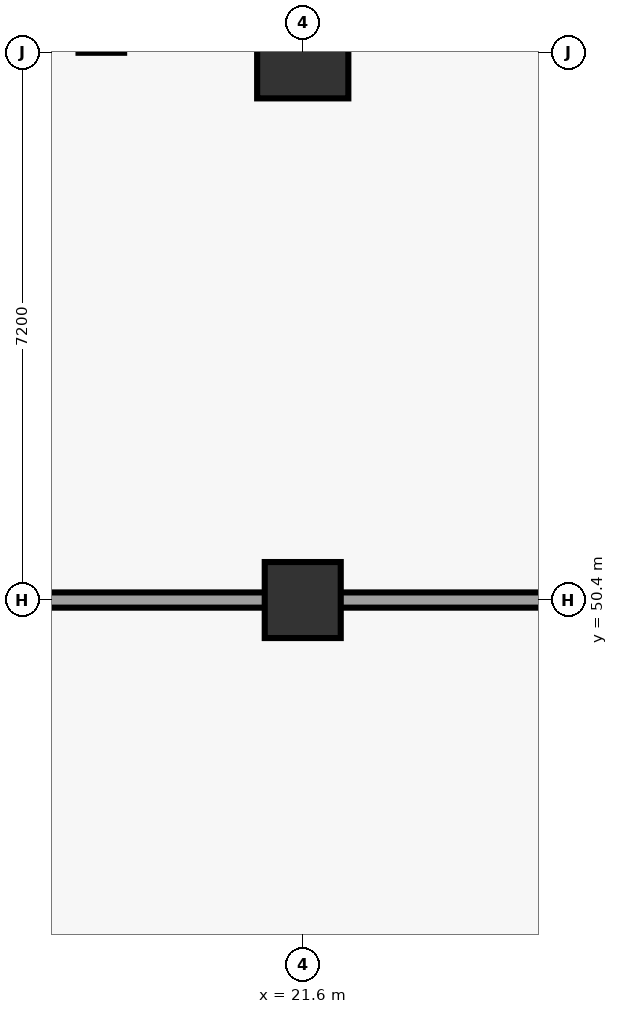
"""IFC4 building model, lengths in metres.
Left out: names, types, materials, properties, quantities, classifications, styles, units other than length and angle.
Written with IfcOpenShell. Run it as: python <this file> out.ifc"""

import sys

from ifc_helpers import new_model, si_unit, direction, frame, frame_2d, origin, origin_2d, place, context, subcontext, project, spatial, rectangle, circle, extrude, element, save


model = new_model("IFC4")
c1 = context("Model", 3, precision=1e-05, world=origin(), true_north=direction((0.0, 1.0)))
c2 = subcontext(c1, "Body", "Model", "MODEL_VIEW")
j1 = project(units=[si_unit("LENGTHUNIT", "METRE"), si_unit("PLANEANGLEUNIT", "RADIAN")], contexts=[c1])
p1 = place(None, origin())
s1 = spatial("IfcSite", under=j1, at=p1, CompositionType="ELEMENT")
p2 = place(p1, origin())
s2 = spatial("IfcBuilding", under=s1, at=p2, CompositionType="ELEMENT")
p3 = place(p2, frame((0.0, 0.0, -5.4)))
s3 = spatial("IfcBuildingStorey", under=s2, at=p3, CompositionType="ELEMENT", Elevation=-5.4)
p4 = place(p3, frame((21.6, 50.4, 0.0), z_axis=(0.0, 0.0, 1.0), x_axis=(1.0, 0.0, 0.0)))
e1 = element("IfcColumn", 1, at=p4, inside=s3, PredefinedType="COLUMN", context=c2, shape_type="SweptSolid", body=[
    extrude(rectangle(XDim=1.0, YDim=1.0, at=origin_2d()), origin(), (0.0, 0.0, 1.0), 5.4),
])
p5 = place(p3, frame((21.6, 57.6, 0.0), z_axis=(0.0, 0.0, 1.0), x_axis=(1.0, 0.0, 0.0)))
e2 = element("IfcColumn", 2, at=p5, inside=s3, PredefinedType="COLUMN", context=c2, shape_type="SweptSolid", body=[
    extrude(circle(Radius=0.6, at=origin_2d()), origin(), (0.0, 0.0, 1.0), 5.4),
])
p6 = place(p3, frame((18.95, 57.9, 0.0), z_axis=(0.0, 0.0, 1.0), x_axis=(1.0, 0.0, 0.0)))
e3 = element("IfcColumn", 3, at=p6, inside=s3, PredefinedType="COLUMN", context=c2, shape_type="SweptSolid", body=[
    extrude(rectangle(XDim=0.6, YDim=0.6, at=origin_2d()), origin(), (0.0, 0.0, 1.0), 5.4),
])
p7 = place(p3, frame((42.0, 50.4, 0.0), z_axis=(0.0, 0.0, 1.0), x_axis=(-1.0, 0.0, 0.0)))
e4 = element("IfcWall", 4, at=p7, inside=s3, PredefinedType="PARTITIONING", context=c2, shape_type="SweptSolid", body=[
    extrude(rectangle(XDim=32.8, YDim=0.2, at=frame_2d((16.4, 0.0))), origin(), (0.0, 0.0, 1.0), 4.04),
])
save(model, sys.argv[1])
